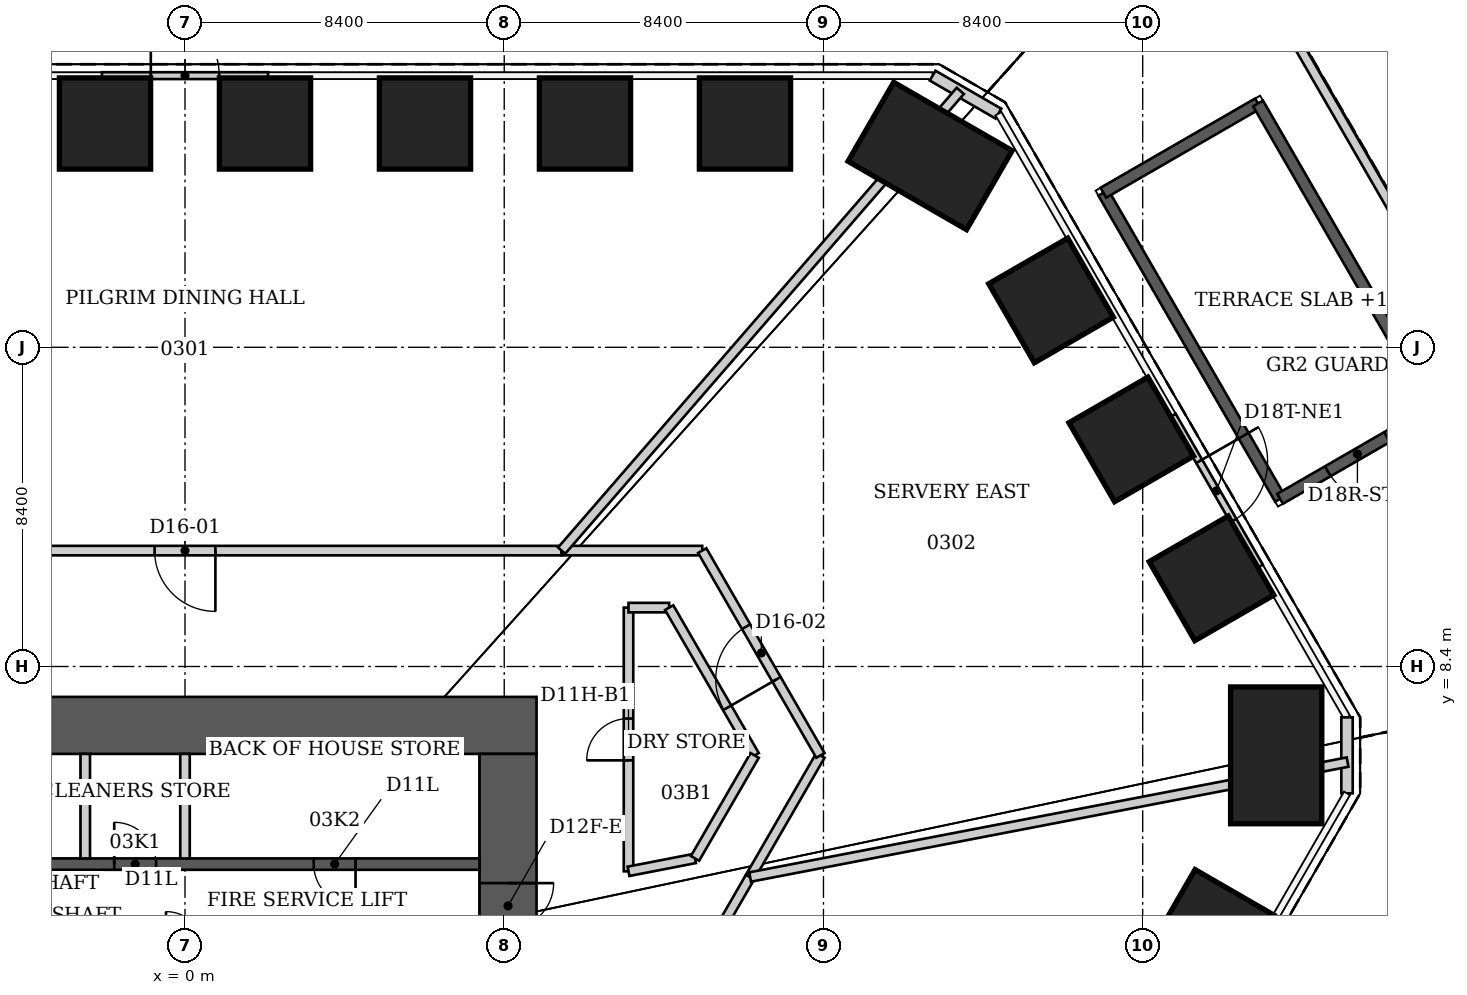
"""IFC4 building model, lengths in metres.
Left out: names, types, materials, properties, quantities, classifications, styles, units other than length and angle.
Written with IfcOpenShell. Run it as: python <this file> out.ifc"""

import sys

from ifc_helpers import new_model, si_unit, direction, frame, frame_2d, origin, origin_2d, place, context, subcontext, project, spatial, rectangle, extrude, element, fill, save


model = new_model("IFC4")
c1 = context("Model", 3, precision=1e-05, world=origin(), true_north=direction((0.0, 1.0)))
c2 = subcontext(c1, "Body", "Model", "MODEL_VIEW")
j1 = project(units=[si_unit("LENGTHUNIT", "METRE"), si_unit("PLANEANGLEUNIT", "RADIAN")], contexts=[c1])
p1 = place(None, origin())
s1 = spatial("IfcSite", under=j1, at=p1, CompositionType="ELEMENT")
p2 = place(p1, origin())
s2 = spatial("IfcBuilding", under=s1, at=p2, CompositionType="ELEMENT")
p3 = place(p2, frame((0.0, 0.0, 18.0)))
s3 = spatial("IfcBuildingStorey", under=s2, at=p3, CompositionType="ELEMENT", Elevation=18.0)
for number, where, z_axis, x_axis in (
    (1, (-2.105, 22.689, 0.0), (0.0, 0.0, 1.0), (0.0, 1.0, 0.0)),
    (2, (2.105, 22.689, 0.0), (0.0, 0.0, 1.0), (0.0, 1.0, 0.0)),
    (3, (6.315, 22.689, 0.0), (0.0, 0.0, 1.0), (0.0, 1.0, 0.0)),
    (4, (10.525, 22.689, 0.0), (0.0, 0.0, 1.0), (0.0, 1.0, 0.0)),
    (5, (14.735, 22.689, 0.0), (0.0, 0.0, 1.0), (0.0, 1.0, 0.0)),
):
    element("IfcColumn", number, at=place(p3, frame(where, z_axis=z_axis, x_axis=x_axis)), inside=s3, PredefinedType="COLUMN", context=c2, shape_type="SweptSolid", body=[
        extrude(rectangle(XDim=2.4, YDim=2.4, at=origin_2d()), origin(), (0.0, 0.0, 1.0), 5.0),
    ])
p4 = place(p3, frame((19.606, 21.835, 0.0), z_axis=(0.0, 0.0, 1.0), x_axis=(0.5, 0.866025403784, 0.0)))
e6 = element("IfcColumn", 6, at=p4, inside=s3, PredefinedType="COLUMN", context=c2, shape_type="SweptSolid", body=[
    extrude(rectangle(XDim=2.4, YDim=3.6, at=origin_2d()), origin(), (0.0, 0.0, 1.0), 5.0),
])
for number, where, z_axis, x_axis in (
    (7, (22.788, 18.032, 0.0), (0.0, 0.0, 1.0), (0.866, 0.5, 0.0)),
    (8, (24.899, 14.375, 0.0), (0.0, 0.0, 1.0), (0.866, 0.5, 0.0)),
    (9, (27.01, 10.719, 0.0), (0.0, 0.0, 1.0), (0.866, 0.5, 0.0)),
):
    element("IfcColumn", number, at=place(p3, frame(where, z_axis=z_axis, x_axis=x_axis)), inside=s3, PredefinedType="COLUMN", context=c2, shape_type="SweptSolid", body=[
        extrude(rectangle(XDim=2.4, YDim=2.4, at=origin_2d()), origin(), (0.0, 0.0, 1.0), 5.0),
    ])
p5 = place(p3, frame((28.713, 6.062, 0.0), z_axis=(0.0, 0.0, 1.0), x_axis=(1.0, 0.0, 0.0)))
e10 = element("IfcColumn", 10, at=p5, inside=s3, PredefinedType="COLUMN", context=c2, shape_type="SweptSolid", body=[
    extrude(rectangle(XDim=2.4, YDim=3.6, at=origin_2d()), origin(), (0.0, 0.0, 1.0), 5.0),
])
p6 = place(p3, frame((27.016, 1.416, 0.0), z_axis=(0.0, 0.0, 1.0), x_axis=(0.866025403784, -0.5, 0.0)))
e11 = element("IfcColumn", 11, at=p6, inside=s3, PredefinedType="COLUMN", context=c2, shape_type="SweptSolid", body=[
    extrude(rectangle(XDim=2.4, YDim=2.4, at=origin_2d()), origin(), (0.0, 0.0, 1.0), 5.0),
])
p7 = place(p3, frame((-9.25, 6.85, 0.0), z_axis=(0.0, 0.0, 1.0), x_axis=(1.0, 0.0, 0.0)))
e12 = element("IfcWall", 12, at=p7, inside=s3, PredefinedType="SHEAR", context=c2, shape_type="SweptSolid", body=[
    extrude(rectangle(XDim=18.5, YDim=1.5, at=frame_2d((9.25, 0.0))), origin(), (0.0, 0.0, 1.0), 5.0),
])
p8 = place(p3, frame((8.5, -9.2, 0.0), z_axis=(0.0, 0.0, 1.0), x_axis=(0.0, 1.0, 0.0)))
e13 = element("IfcWall", 13, at=p8, inside=s3, PredefinedType="SHEAR", context=c2, shape_type="SweptSolid", body=[
    extrude(rectangle(XDim=15.3, YDim=1.5, at=frame_2d((7.65, 0.0))), origin(), (0.0, 0.0, 1.0), 5.0),
])
p9 = place(p8, frame((10.7, 0.0, 0.0)))
e14 = element("IfcOpeningElement", 14, at=p9, cuts=e13, PredefinedType="OPENING", context=c2, shape_type="SweptSolid", body=[
    extrude(rectangle(XDim=1.2, YDim=2.2, at=frame_2d((0.6, 1.1))), frame((0.0, 0.75, 0.0), z_axis=(0.0, -1.0, 0.0), x_axis=(1.0, 0.0, 0.0)), (0.0, 0.0, 1.0), 1.5),
])
p10 = place(p3, frame((-7.75, 3.2, 0.0), z_axis=(0.0, 0.0, 1.0), x_axis=(1.0, 0.0, 0.0)))
e15 = element("IfcWall", 15, at=p10, inside=s3, PredefinedType="SHEAR", context=c2, shape_type="SweptSolid", body=[
    extrude(rectangle(XDim=15.5, YDim=0.3, at=frame_2d((7.75, 0.0))), origin(), (0.0, 0.0, 1.0), 5.0),
])
p11 = place(p10, frame((5.887, 0.0, 0.0)))
e16 = element("IfcOpeningElement", 16, at=p11, cuts=e15, PredefinedType="OPENING", context=c2, shape_type="SweptSolid", body=[
    extrude(rectangle(XDim=1.1, YDim=2.2, at=frame_2d((0.55, 1.1))), frame((0.0, 0.15, 0.0), z_axis=(0.0, -1.0, 0.0), x_axis=(1.0, 0.0, 0.0)), (0.0, 0.0, 1.0), 0.3),
])
p12 = place(p10, frame((11.137, 0.0, 0.0)))
e17 = element("IfcOpeningElement", 17, at=p12, cuts=e15, PredefinedType="OPENING", context=c2, shape_type="SweptSolid", body=[
    extrude(rectangle(XDim=1.1, YDim=2.2, at=frame_2d((0.55, 1.1))), frame((0.0, 0.15, 0.0), z_axis=(0.0, -1.0, 0.0), x_axis=(1.0, 0.0, 0.0)), (0.0, 0.0, 1.0), 0.3),
])
for number, where, z_axis, x_axis in (
    (18, (-2.625, 3.35, 0.0), (0.0, 0.0, 1.0), (0.0, 1.0, 0.0)),
    (19, (0.0, 3.35, 0.0), (0.0, 0.0, 1.0), (0.0, 1.0, 0.0)),
):
    element("IfcWall", number, at=place(p3, frame(where, z_axis=z_axis, x_axis=x_axis)), inside=s3, PredefinedType="PARTITIONING", context=c2, shape_type="SweptSolid", body=[
        extrude(rectangle(XDim=2.75, YDim=0.25, at=frame_2d((1.375, 0.0))), origin(), (0.0, 0.0, 1.0), 5.0),
    ])
p13 = place(p3, frame((-2.186, 23.949, 0.0), z_axis=(0.0, 0.0, 1.0), x_axis=(1.0, 0.0, 0.0)))
e20 = element("IfcWall", 20, at=p13, inside=s3, PredefinedType="SOLIDWALL", context=c2, shape_type="SweptSolid", body=[
    extrude(rectangle(XDim=4.372, YDim=0.18, at=frame_2d((2.186, 0.0))), origin(), (0.0, 0.0, 1.0), 4.84),
])
p14 = place(p13, frame((1.286, 0.0, 0.0)))
e21 = element("IfcOpeningElement", 21, at=p14, cuts=e20, PredefinedType="OPENING", context=c2, shape_type="SweptSolid", body=[
    extrude(rectangle(XDim=1.8, YDim=2.4, at=frame_2d((0.9, 1.2))), frame((0.0, 0.09, 0.0), z_axis=(0.0, -1.0, 0.0), x_axis=(1.0, 0.0, 0.0)), (0.0, 0.0, 1.0), 0.18),
])
p15 = place(p3, frame((19.672, 23.949, 0.0), z_axis=(0.0, 0.0, 1.0), x_axis=(0.866010750942, -0.50002537861, 0.0)))
e22 = element("IfcWall", 22, at=p15, inside=s3, PredefinedType="SOLIDWALL", context=c2, shape_type="SweptSolid", body=[
    extrude(rectangle(XDim=2.0, YDim=0.3, at=frame_2d((1.0, 0.0))), origin(), (0.0, 0.0, 1.0), 4.84),
])
p16 = place(p3, frame((25.99, 15.005, 0.0), z_axis=(0.0, 0.0, 1.0), x_axis=(0.499986657325, -0.866033107044, 0.0)))
e23 = element("IfcWall", 23, at=p16, inside=s3, PredefinedType="SOLIDWALL", context=c2, shape_type="SweptSolid", body=[
    extrude(rectangle(XDim=4.586, YDim=0.18, at=frame_2d((2.293, 0.0))), origin(), (0.0, 0.0, 1.0), 4.84),
])
p17 = place(p16, frame((1.393, 0.0, 0.0)))
e24 = element("IfcOpeningElement", 24, at=p17, cuts=e23, PredefinedType="OPENING", context=c2, shape_type="SweptSolid", body=[
    extrude(rectangle(XDim=1.8, YDim=2.4, at=frame_2d((0.9, 1.2))), frame((0.0, 0.09, 0.0), z_axis=(0.0, -1.0, 0.0), x_axis=(1.0, 0.0, 0.0)), (0.0, 0.0, 1.0), 0.18),
])
p18 = place(p3, frame((30.576, 7.062, 0.0), z_axis=(0.0, 0.0, 1.0), x_axis=(0.0, -1.0, 0.0)))
e25 = element("IfcWall", 25, at=p18, inside=s3, PredefinedType="SOLIDWALL", context=c2, shape_type="SweptSolid", body=[
    extrude(rectangle(XDim=2.0, YDim=0.3, at=frame_2d((1.0, 0.0))), origin(), (0.0, 0.0, 1.0), 4.84),
])
p19 = place(p3, frame((13.794, -36.498, -0.15), z_axis=(0.0, 0.0, 1.0), x_axis=(0.500000964025, 0.866024847203, 0.0)))
e26 = element("IfcWall", 26, at=p19, inside=s3, PredefinedType="PARAPET", context=c2, shape_type="SweptSolid", body=[
    extrude(rectangle(XDim=49.423, YDim=0.25, at=frame_2d((24.712, 0.0))), origin(), (0.0, 0.0, 1.0), 1.25),
])
p20 = place(p3, frame((38.507, 8.794, -0.15), z_axis=(0.0, 0.0, 1.0), x_axis=(-0.50000302432, 0.866023657685, 0.0)))
e27 = element("IfcWall", 27, at=p20, inside=s3, PredefinedType="PARAPET", context=c2, shape_type="SweptSolid", body=[
    extrude(rectangle(XDim=23.275, YDim=0.25, at=frame_2d((11.637, 0.0))), origin(), (0.0, 0.0, 1.0), 1.25),
])
p21 = place(p3, frame((9.91, 11.45, 0.0), z_axis=(0.0, 0.0, 1.0), x_axis=(-1.0, 0.0, 0.0)))
e28 = element("IfcWall", 28, at=p21, inside=s3, PredefinedType="PARTITIONING", context=c2, shape_type="SweptSolid", body=[
    extrude(rectangle(XDim=19.82, YDim=0.25, at=frame_2d((9.91, 0.0))), origin(), (0.0, 0.0, 1.0), 4.84),
])
p22 = place(p21, frame((9.11, 0.0, 0.0)))
e29 = element("IfcOpeningElement", 29, at=p22, cuts=e28, PredefinedType="OPENING", context=c2, shape_type="SweptSolid", body=[
    extrude(rectangle(XDim=1.6, YDim=2.4, at=frame_2d((0.8, 1.2))), frame((0.0, 0.125, 0.0), z_axis=(0.0, -1.0, 0.0), x_axis=(1.0, 0.0, 0.0)), (0.0, 0.0, 1.0), 0.25),
])
p23 = place(p3, frame((11.67, 3.01, 0.0), z_axis=(0.0, 0.0, 1.0), x_axis=(0.0, 1.0, 0.0)))
e30 = element("IfcWall", 30, at=p23, inside=s3, PredefinedType="PARTITIONING", context=c2, shape_type="SweptSolid", body=[
    extrude(rectangle(XDim=6.94, YDim=0.25, at=frame_2d((3.47, 0.0))), origin(), (0.0, 0.0, 1.0), 4.84),
])
p24 = place(p23, frame((2.92, 0.0, 0.0)))
e31 = element("IfcOpeningElement", 31, at=p24, cuts=e30, PredefinedType="OPENING", context=c2, shape_type="SweptSolid", body=[
    extrude(rectangle(XDim=1.1, YDim=2.2, at=frame_2d((0.55, 1.1))), frame((0.0, 0.125, 0.0), z_axis=(0.0, -1.0, 0.0), x_axis=(1.0, 0.0, 0.0)), (0.0, 0.0, 1.0), 0.25),
])
p25 = place(p3, frame((11.67, 9.95, 0.0), z_axis=(0.0, 0.0, 1.0), x_axis=(1.0, 0.0, 0.0)))
e32 = element("IfcWall", 32, at=p25, inside=s3, PredefinedType="PARTITIONING", context=c2, shape_type="SweptSolid", body=[
    extrude(rectangle(XDim=1.07, YDim=0.25, at=frame_2d((0.535, 0.0))), origin(), (0.0, 0.0, 1.0), 4.84),
])
p26 = place(p3, frame((12.74, 9.95, 0.0), z_axis=(0.0, 0.0, 1.0), x_axis=(0.50069571766, -0.865623358232, 0.0)))
e33 = element("IfcWall", 33, at=p26, inside=s3, PredefinedType="PARTITIONING", context=c2, shape_type="SweptSolid", body=[
    extrude(rectangle(XDim=4.494, YDim=0.25, at=frame_2d((2.247, 0.0))), origin(), (0.0, 0.0, 1.0), 4.84),
])
p27 = place(p3, frame((13.42, 3.35, 0.0), z_axis=(0.0, 0.0, 1.0), x_axis=(-0.981635340877, -0.190767024252, 0.0)))
e34 = element("IfcWall", 34, at=p27, inside=s3, PredefinedType="PARTITIONING", context=c2, shape_type="SweptSolid", body=[
    extrude(rectangle(XDim=1.783, YDim=0.25, at=frame_2d((0.891, 0.0))), origin(), (0.0, 0.0, 1.0), 4.84),
])
p28 = place(p3, frame((13.61, 11.45, 0.0), z_axis=(0.0, 0.0, 1.0), x_axis=(-1.0, 0.0, 0.0)))
e35 = element("IfcWall", 35, at=p28, inside=s3, PredefinedType="PARTITIONING", context=c2, shape_type="SweptSolid", body=[
    extrude(rectangle(XDim=3.7, YDim=0.25, at=frame_2d((1.85, 0.0))), origin(), (0.0, 0.0, 1.0), 4.84),
])
p29 = place(p3, frame((13.745, 0.913, 0.0), z_axis=(0.0, 0.0, 1.0), x_axis=(0.500248658738, 0.865881792989, 0.0)))
e36 = element("IfcWall", 36, at=p29, inside=s3, PredefinedType="PARTITIONING", context=c2, shape_type="SweptSolid", body=[
    extrude(rectangle(XDim=2.249, YDim=0.25, at=frame_2d((1.125, 0.0))), origin(), (0.0, 0.0, 1.0), 4.84),
])
p30 = place(p3, frame((14.87, 2.86, 0.0), z_axis=(0.0, 0.0, 1.0), x_axis=(0.500499855385, 0.86573661974, 0.0)))
e37 = element("IfcWall", 37, at=p30, inside=s3, PredefinedType="PARTITIONING", context=c2, shape_type="SweptSolid", body=[
    extrude(rectangle(XDim=3.697, YDim=0.25, at=frame_2d((1.848, 0.0))), origin(), (0.0, 0.0, 1.0), 4.84),
])
p31 = place(p3, frame((14.99, 6.06, 0.0), z_axis=(0.0, 0.0, 1.0), x_axis=(-0.501309724655, -0.865267912248, 0.0)))
e38 = element("IfcWall", 38, at=p31, inside=s3, PredefinedType="PARTITIONING", context=c2, shape_type="SweptSolid", body=[
    extrude(rectangle(XDim=3.132, YDim=0.25, at=frame_2d((1.566, 0.0))), origin(), (0.0, 0.0, 1.0), 4.84),
])
p32 = place(p3, frame((16.72, 6.06, 0.0), z_axis=(0.0, 0.0, 1.0), x_axis=(-0.499759814377, 0.866164030617, 0.0)))
e39 = element("IfcWall", 39, at=p32, inside=s3, PredefinedType="PARTITIONING", context=c2, shape_type="SweptSolid", body=[
    extrude(rectangle(XDim=6.223, YDim=0.25, at=frame_2d((3.111, 0.0))), origin(), (0.0, 0.0, 1.0), 4.84),
])
p33 = place(p32, frame((2.312, 0.0, 0.0)))
e40 = element("IfcOpeningElement", 40, at=p33, cuts=e39, PredefinedType="OPENING", context=c2, shape_type="SweptSolid", body=[
    extrude(rectangle(XDim=1.6, YDim=2.4, at=frame_2d((0.8, 1.2))), frame((0.0, 0.125, 0.0), z_axis=(0.0, -1.0, 0.0), x_axis=(1.0, 0.0, 0.0)), (0.0, 0.0, 1.0), 0.25),
])
p34 = place(p3, frame((20.4, 23.547, 0.0), z_axis=(0.0, 0.0, 1.0), x_axis=(-0.655146445725, -0.7555019091, 0.0)))
e41 = element("IfcWall", 41, at=p34, inside=s3, PredefinedType="PARTITIONING", context=c2, shape_type="SweptSolid", body=[
    extrude(rectangle(XDim=16.012, YDim=0.25, at=frame_2d((8.006, 0.0))), origin(), (0.0, 0.0, 1.0), 4.84),
])
p35 = place(p3, frame((30.591, 5.884, 0.0), z_axis=(0.0, 0.0, 1.0), x_axis=(-0.981994806005, -0.188907916665, 0.0)))
e42 = element("IfcWall", 42, at=p35, inside=s3, PredefinedType="PARTITIONING", context=c2, shape_type="SweptSolid", body=[
    extrude(rectangle(XDim=16.009, YDim=0.25, at=frame_2d((8.004, 0.0))), origin(), (0.0, 0.0, 1.0), 4.84),
])
p36 = place(p3, frame((28.815, 12.813, 0.0), z_axis=(0.0, 0.0, 1.0), x_axis=(-0.500015592816, 0.866016401081, 0.0)))
e43 = element("IfcWall", 43, at=p36, inside=s3, PredefinedType="SHEAR", context=c2, shape_type="SweptSolid", body=[
    extrude(rectangle(XDim=9.3, YDim=0.3, at=frame_2d((4.65, 0.0))), origin(), (0.0, 0.0, 1.0), 3.2),
])
p37 = place(p3, frame((24.165, 20.867, 0.0), z_axis=(0.0, 0.0, 1.0), x_axis=(0.866016039709, 0.500016218704, 0.0)))
e44 = element("IfcWall", 44, at=p37, inside=s3, PredefinedType="SHEAR", context=c2, shape_type="SweptSolid", body=[
    extrude(rectangle(XDim=4.7, YDim=0.3, at=frame_2d((2.35, 0.0))), origin(), (0.0, 0.0, 1.0), 3.2),
])
p38 = place(p3, frame((28.235, 23.217, 0.0), z_axis=(0.0, 0.0, 1.0), x_axis=(0.500004225487, -0.866022964185, 0.0)))
e45 = element("IfcWall", 45, at=p38, inside=s3, PredefinedType="SHEAR", context=c2, shape_type="SweptSolid", body=[
    extrude(rectangle(XDim=9.3, YDim=0.3, at=frame_2d((4.65, 0.0))), origin(), (0.0, 0.0, 1.0), 3.2),
])
p39 = place(p3, frame((32.885, 15.163, 0.0), z_axis=(0.0, 0.0, 1.0), x_axis=(-0.866038532462, -0.499977259774, 0.0)))
e46 = element("IfcWall", 46, at=p39, inside=s3, PredefinedType="SHEAR", context=c2, shape_type="SweptSolid", body=[
    extrude(rectangle(XDim=4.7, YDim=0.3, at=frame_2d((2.35, 0.0))), origin(), (0.0, 0.0, 1.0), 3.2),
])
p40 = place(p39, frame((1.45, 0.0, 0.0)))
e47 = element("IfcOpeningElement", 47, at=p40, cuts=e46, PredefinedType="OPENING", context=c2, shape_type="SweptSolid", body=[
    extrude(rectangle(XDim=1.8, YDim=2.1, at=frame_2d((0.9, 1.05))), frame((0.0, 0.15, 0.0), z_axis=(0.0, -1.0, 0.0), x_axis=(1.0, 0.0, 0.0)), (0.0, 0.0, 1.0), 0.3),
])
p41 = place(p14, origin())
e48 = element("IfcDoor", 48, at=p41, inside=s3, OperationType="SINGLE_SWING_LEFT", PredefinedType="DOOR", context=c2, shape_type="SweptSolid", body=[
    extrude(rectangle(XDim=1.8, YDim=2.4, at=frame_2d((0.9, 1.2))), frame((0.0, 0.025, 0.0), z_axis=(0.0, -1.0, 0.0), x_axis=(1.0, 0.0, 0.0)), (0.0, 0.0, 1.0), 0.05),
])
fill(e21, e48)
p42 = place(p17, origin())
e49 = element("IfcDoor", 49, at=p42, inside=s3, OperationType="SINGLE_SWING_LEFT", PredefinedType="DOOR", context=c2, shape_type="SweptSolid", body=[
    extrude(rectangle(XDim=1.8, YDim=2.4, at=frame_2d((0.9, 1.2))), frame((0.0, 0.025, 0.0), z_axis=(0.0, -1.0, 0.0), x_axis=(1.0, 0.0, 0.0)), (0.0, 0.0, 1.0), 0.05),
])
fill(e24, e49)
p43 = place(p22, origin())
e50 = element("IfcDoor", 50, at=p43, inside=s3, OperationType="DOUBLE_DOOR_SINGLE_SWING", PredefinedType="DOOR", context=c2, shape_type="SweptSolid", body=[
    extrude(rectangle(XDim=1.6, YDim=2.4, at=frame_2d((0.8, 1.2))), frame((0.0, 0.025, 0.0), z_axis=(0.0, -1.0, 0.0), x_axis=(1.0, 0.0, 0.0)), (0.0, 0.0, 1.0), 0.05),
])
fill(e29, e50)
p44 = place(p33, origin())
e51 = element("IfcDoor", 51, at=p44, inside=s3, OperationType="DOUBLE_DOOR_SINGLE_SWING", PredefinedType="DOOR", context=c2, shape_type="SweptSolid", body=[
    extrude(rectangle(XDim=1.6, YDim=2.4, at=frame_2d((0.8, 1.2))), frame((0.0, 0.025, 0.0), z_axis=(0.0, -1.0, 0.0), x_axis=(1.0, 0.0, 0.0)), (0.0, 0.0, 1.0), 0.05),
])
fill(e40, e51)
p45 = place(p24, origin())
e52 = element("IfcDoor", 52, at=p45, inside=s3, OperationType="SINGLE_SWING_LEFT", PredefinedType="DOOR", context=c2, shape_type="SweptSolid", body=[
    extrude(rectangle(XDim=1.1, YDim=2.2, at=frame_2d((0.55, 1.1))), frame((0.0, 0.025, 0.0), z_axis=(0.0, -1.0, 0.0), x_axis=(1.0, 0.0, 0.0)), (0.0, 0.0, 1.0), 0.05),
])
fill(e31, e52)
p46 = place(p9, origin())
e53 = element("IfcDoor", 53, at=p46, inside=s3, OperationType="SINGLE_SWING_RIGHT", PredefinedType="DOOR", context=c2, shape_type="SweptSolid", body=[
    extrude(rectangle(XDim=1.2, YDim=2.2, at=frame_2d((0.6, 1.1))), frame((0.0, 0.025, 0.0), z_axis=(0.0, -1.0, 0.0), x_axis=(1.0, 0.0, 0.0)), (0.0, 0.0, 1.0), 0.05),
])
fill(e14, e53)
p47 = place(p11, origin())
e54 = element("IfcDoor", 54, at=p47, inside=s3, OperationType="SINGLE_SWING_LEFT", PredefinedType="DOOR", context=c2, shape_type="SweptSolid", body=[
    extrude(rectangle(XDim=1.1, YDim=2.2, at=frame_2d((0.55, 1.1))), frame((0.0, 0.025, 0.0), z_axis=(0.0, -1.0, 0.0), x_axis=(1.0, 0.0, 0.0)), (0.0, 0.0, 1.0), 0.05),
])
fill(e16, e54)
p48 = place(p12, origin())
e55 = element("IfcDoor", 55, at=p48, inside=s3, OperationType="SINGLE_SWING_RIGHT", PredefinedType="DOOR", context=c2, shape_type="SweptSolid", body=[
    extrude(rectangle(XDim=1.1, YDim=2.2, at=frame_2d((0.55, 1.1))), frame((0.0, 0.025, 0.0), z_axis=(0.0, -1.0, 0.0), x_axis=(1.0, 0.0, 0.0)), (0.0, 0.0, 1.0), 0.05),
])
fill(e17, e55)
p49 = place(p40, origin())
e56 = element("IfcDoor", 56, at=p49, inside=s3, OperationType="DOUBLE_DOOR_SINGLE_SWING", PredefinedType="DOOR", context=c2, shape_type="SweptSolid", body=[
    extrude(rectangle(XDim=1.8, YDim=2.1, at=frame_2d((0.9, 1.05))), frame((0.0, 0.025, 0.0), z_axis=(0.0, -1.0, 0.0), x_axis=(1.0, 0.0, 0.0)), (0.0, 0.0, 1.0), 0.05),
])
fill(e47, e56)
save(model, sys.argv[1])
